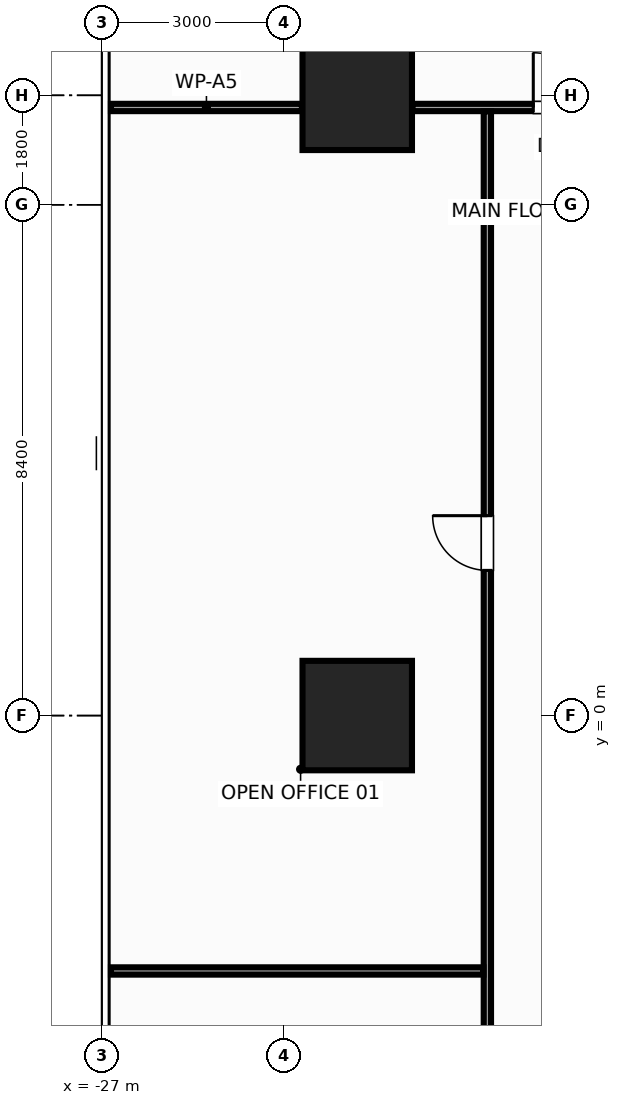
"""IFC4 building model, lengths in metres.
Left out: names, types, materials, properties, quantities, classifications, styles, units other than length and angle.
Written with IfcOpenShell. Run it as: python <this file> out.ifc"""

import sys

from ifc_helpers import new_model, si_unit, direction, frame, frame_2d, origin, origin_2d, place, context, subcontext, project, spatial, rectangle, extrude, source, transform, mapped, element, fill, save


model = new_model("IFC4")
c1 = context("Model", 3, precision=1e-05, world=origin(), true_north=direction((0.0, 1.0)))
c2 = subcontext(c1, "Body", "Model", "MODEL_VIEW")
j1 = project(units=[si_unit("LENGTHUNIT", "METRE"), si_unit("PLANEANGLEUNIT", "RADIAN")], contexts=[c1])
p1 = place(None, origin())
s1 = spatial("IfcSite", under=j1, at=p1, CompositionType="ELEMENT")
p2 = place(p1, origin())
s2 = spatial("IfcBuilding", under=s1, at=p2, CompositionType="ELEMENT")
p3 = place(p2, frame((0.0, 0.0, 27.2)))
s3 = spatial("IfcBuildingStorey", under=s2, at=p3, CompositionType="ELEMENT", Elevation=27.2)
m1 = source(origin(), c2, "Body", "SweptSolid", [
    extrude(rectangle(XDim=1.8, YDim=1.8, at=origin_2d()), origin(), (0.0, 0.0, 1.0), 3.6),
])
for number, where, z_axis, x_axis in (
    (1, (-22.8, 0.0, 0.0), (0.0, 0.0, 1.0), (1.0, 0.0, 0.0)),
    (2, (-22.8, 10.2, 0.0), (0.0, 0.0, 1.0), (1.0, 0.0, 0.0)),
):
    element("IfcColumn", number, at=place(p3, frame(where, z_axis=z_axis, x_axis=x_axis)), inside=s3, PredefinedType="COLUMN", context=c2, shape_type="MappedRepresentation", body=[
        mapped(m1, transform((0.0, 0.0, 0.0), x_axis=(1.0, 0.0, 0.0), y_axis=(0.0, 1.0, 0.0), z_axis=(0.0, 0.0, 1.0), scale=1.0)),
    ])
m2 = source(origin(), c2, "Body", "SweptSolid", [
    extrude(rectangle(XDim=3.14, YDim=0.12, at=frame_2d((1.57, 0.0))), origin(), (0.0, 0.0, 1.0), 2.435),
])
p4 = place(p3, frame((-26.85, 10.0, 0.0), z_axis=(0.0, 0.0, 1.0), x_axis=(1.0, 0.0, 0.0)))
e3 = element("IfcWall", 3, at=p4, inside=s3, PredefinedType="PARTITIONING", context=c2, shape_type="MappedRepresentation", body=[
    mapped(m2, transform((0.0, 0.0, 0.0), x_axis=(1.0, 0.0, 0.0), y_axis=(0.0, 1.0, 0.0), z_axis=(0.0, 0.0, 1.0), scale=1.0)),
])
m3 = source(origin(), c2, "Body", "SweptSolid", [
    extrude(rectangle(XDim=4.18, YDim=0.12, at=frame_2d((2.09, 0.0))), origin(), (0.0, 0.0, 1.0), 2.745),
])
p5 = place(p3, frame((-21.89, 10.0, 0.0), z_axis=(0.0, 0.0, 1.0), x_axis=(1.0, 0.0, 0.0)))
e4 = element("IfcWall", 4, at=p5, inside=s3, PredefinedType="PARTITIONING", context=c2, shape_type="MappedRepresentation", body=[
    mapped(m3, transform((0.0, 0.0, 0.0), x_axis=(1.0, 0.0, 0.0), y_axis=(0.0, 1.0, 0.0), z_axis=(0.0, 0.0, 1.0), scale=1.0)),
])
p6 = place(p5, frame((1.985, 0.0, 0.0)))
e5 = element("IfcOpeningElement", 5, at=p6, cuts=e4, PredefinedType="OPENING", context=c2, shape_type="SweptSolid", body=[
    extrude(rectangle(XDim=0.9, YDim=2.15, at=frame_2d((0.45, 1.075))), frame((0.0, 0.072, 0.0), z_axis=(0.0, -1.0, 0.0), x_axis=(1.0, 0.0, 0.0)), (0.0, 0.0, 1.0), 0.144),
])
m4 = source(origin(), c2, "Body", "SweptSolid", [
    extrude(rectangle(XDim=24.13, YDim=0.12, at=frame_2d((12.065, 0.0))), origin(), (0.0, 0.0, 1.0), 2.745),
])
p7 = place(p3, frame((-20.66, -14.195, 0.0), z_axis=(0.0, 0.0, 1.0), x_axis=(0.0, 1.0, 0.0)))
e6 = element("IfcWall", 6, at=p7, inside=s3, PredefinedType="PARTITIONING", context=c2, shape_type="MappedRepresentation", body=[
    mapped(m4, transform((0.0, 0.0, 0.0), x_axis=(1.0, 0.0, 0.0), y_axis=(0.0, 1.0, 0.0), z_axis=(0.0, 0.0, 1.0), scale=1.0)),
])
p8 = place(p7, frame((16.583, 0.0, 0.0)))
e7 = element("IfcOpeningElement", 7, at=p8, cuts=e6, PredefinedType="OPENING", context=c2, shape_type="SweptSolid", body=[
    extrude(rectangle(XDim=0.9, YDim=2.15, at=frame_2d((0.45, 1.075))), frame((0.0, 0.072, 0.0), z_axis=(0.0, -1.0, 0.0), x_axis=(1.0, 0.0, 0.0)), (0.0, 0.0, 1.0), 0.144),
])
m5 = source(origin(), c2, "Body", "SweptSolid", [
    extrude(rectangle(XDim=6.125, YDim=0.12, at=frame_2d((3.062, 0.0))), origin(), (0.0, 0.0, 1.0), 2.745),
])
p9 = place(p3, frame((-26.85, -4.2, 0.0), z_axis=(0.0, 0.0, 1.0), x_axis=(1.0, 0.0, 0.0)))
e8 = element("IfcWall", 8, at=p9, inside=s3, PredefinedType="PARTITIONING", context=c2, shape_type="MappedRepresentation", body=[
    mapped(m5, transform((0.0, 0.0, 0.0), x_axis=(1.0, 0.0, 0.0), y_axis=(0.0, 1.0, 0.0), z_axis=(0.0, 0.0, 1.0), scale=1.0)),
])
m6 = source(origin(), c2, "Body", "SweptSolid", [
    extrude(rectangle(XDim=0.9, YDim=2.15, at=frame_2d((0.45, 1.075))), frame((0.0, 0.025, 0.0), z_axis=(0.0, -1.0, 0.0), x_axis=(1.0, 0.0, 0.0)), (0.0, 0.0, 1.0), 0.05),
])
p10 = place(p6, origin())
e9 = element("IfcDoor", 9, at=p10, inside=s3, OperationType="SINGLE_SWING_LEFT", PredefinedType="DOOR", context=c2, shape_type="MappedRepresentation", body=[
    mapped(m6, transform((0.0, 0.0, 0.0), x_axis=(1.0, 0.0, 0.0), y_axis=(0.0, 1.0, 0.0), z_axis=(0.0, 0.0, 1.0), scale=1.0)),
])
fill(e5, e9)
p11 = place(p8, origin())
e10 = element("IfcDoor", 10, at=p11, inside=s3, OperationType="SINGLE_SWING_RIGHT", PredefinedType="DOOR", context=c2, shape_type="MappedRepresentation", body=[
    mapped(m6, transform((0.0, 0.0, 0.0), x_axis=(1.0, 0.0, 0.0), y_axis=(0.0, 1.0, 0.0), z_axis=(0.0, 0.0, 1.0), scale=1.0)),
])
fill(e7, e10)
save(model, sys.argv[1])
